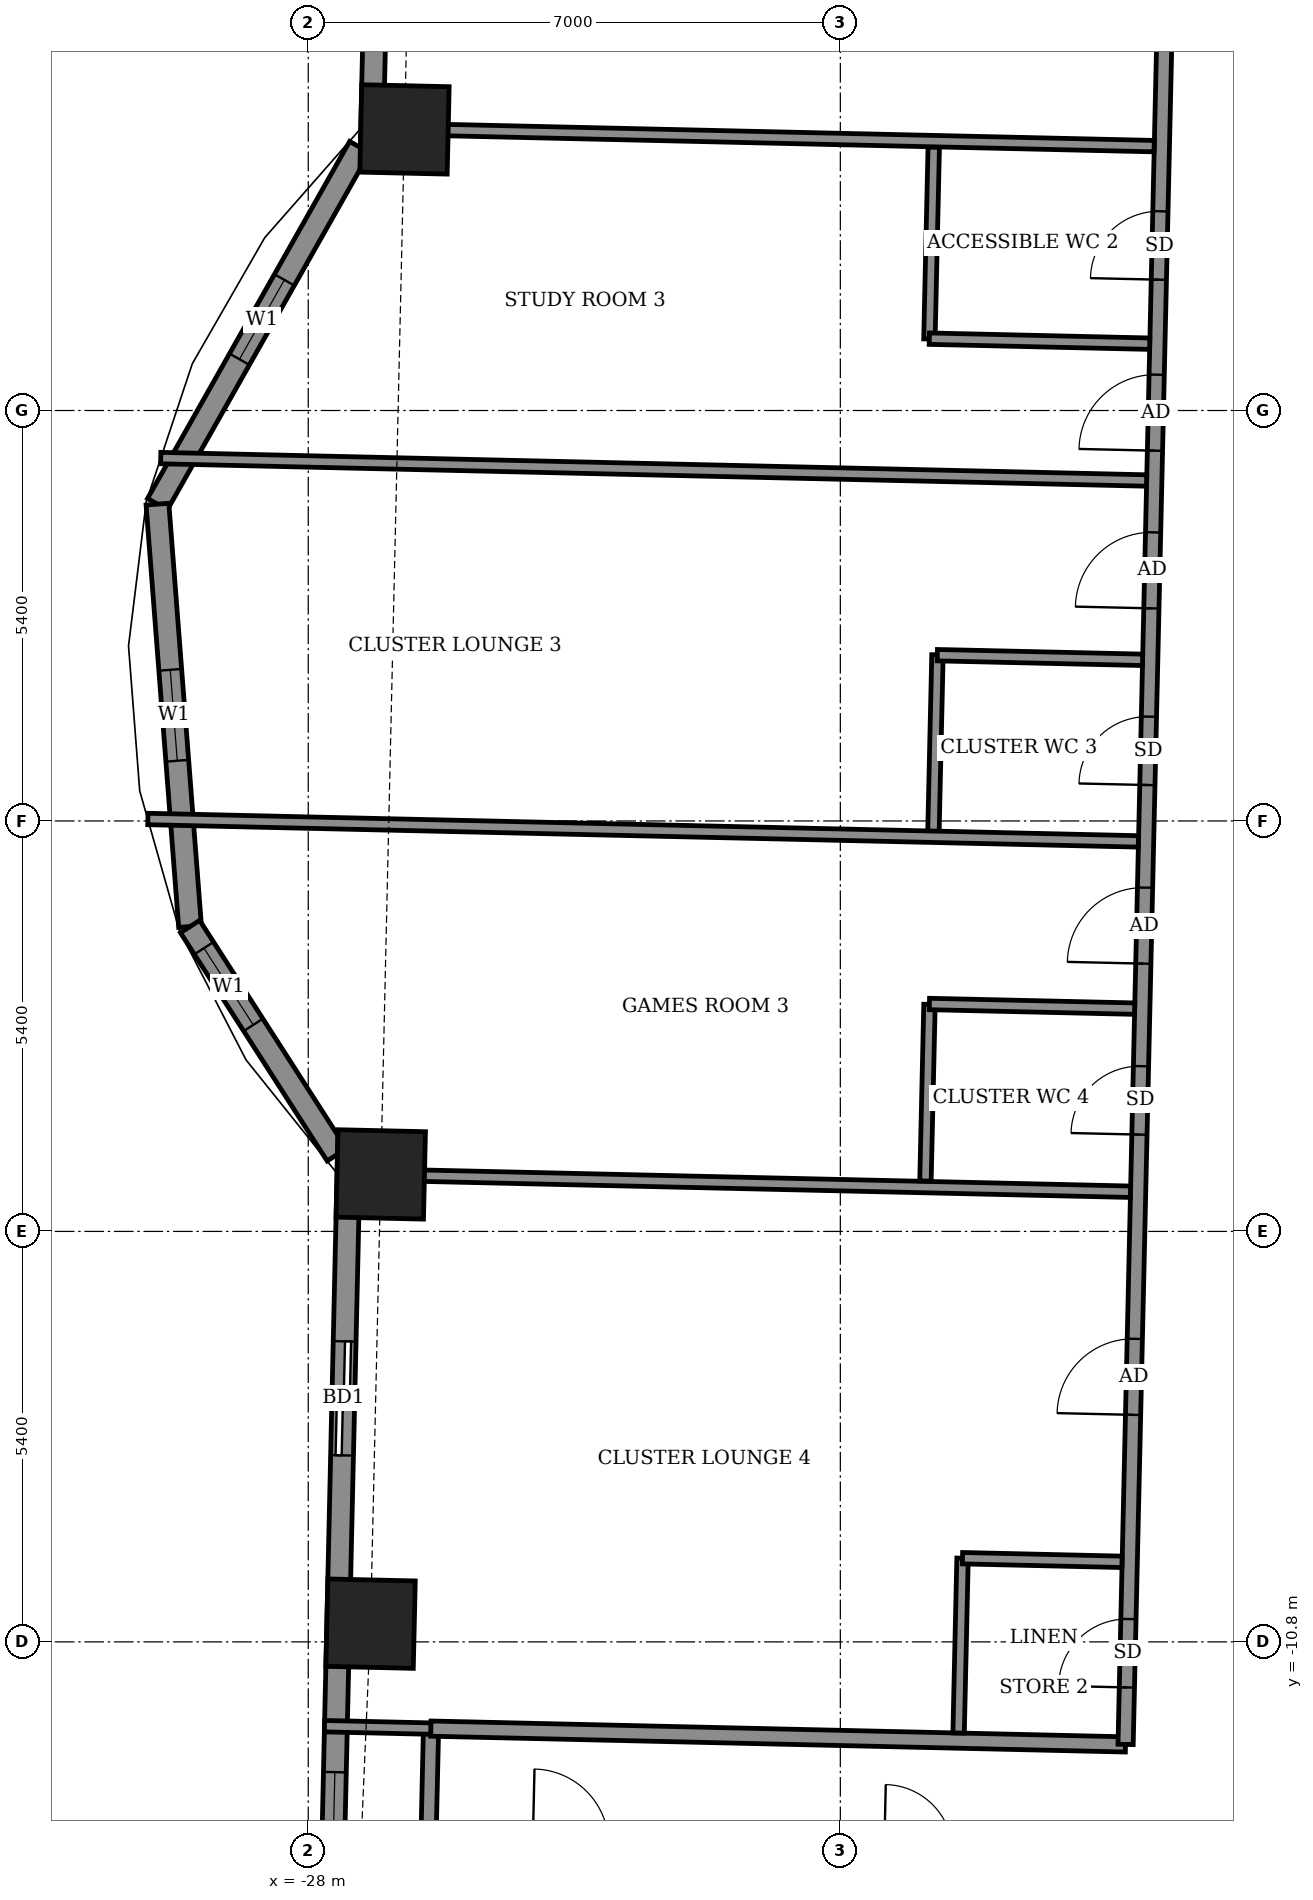
"""IFC4 building model, lengths in metres.
Left out: names, types, materials, properties, quantities, classifications, styles, units other than length and angle.
Written with IfcOpenShell. Run it as: python <this file> out.ifc"""

import sys

from ifc_helpers import new_model, si_unit, direction, frame, frame_2d, origin, origin_2d, place, context, subcontext, project, spatial, rectangle, extrude, element, fill, save


model = new_model("IFC4")
c1 = context("Model", 3, precision=1e-05, world=origin(), true_north=direction((0.0, 1.0)))
c2 = subcontext(c1, "Body", "Model", "MODEL_VIEW")
j1 = project(units=[si_unit("LENGTHUNIT", "METRE"), si_unit("PLANEANGLEUNIT", "RADIAN")], contexts=[c1])
p1 = place(None, origin())
s1 = spatial("IfcSite", under=j1, at=p1, CompositionType="ELEMENT")
p2 = place(p1, origin())
s2 = spatial("IfcBuilding", under=s1, at=p2, CompositionType="ELEMENT")
p3 = place(p2, frame((0.0, 0.0, 205.1)))
s3 = spatial("IfcBuildingStorey", under=s2, at=p3, CompositionType="ELEMENT", Elevation=205.1)
for number, where, z_axis, x_axis in (
    (1, (-27.046, -4.65, -0.55), (0.0, 0.0, 1.0), (-0.023, -1.0, 0.0)),
    (2, (-27.18, -10.56, -0.55), (0.0, 0.0, 1.0), (-0.023, -1.0, 0.0)),
    (3, (-26.734, 9.098, -0.55), (0.0, 0.0, 1.0), (-0.023, -1.0, 0.0)),
):
    element("IfcColumn", number, at=place(p3, frame(where, z_axis=z_axis, x_axis=x_axis)), inside=s3, PredefinedType="COLUMN", context=c2, shape_type="SweptSolid", body=[
        extrude(rectangle(XDim=1.15, YDim=1.15, at=origin_2d()), origin(), (0.0, 0.0, 1.0), 3.6),
    ])
p4 = place(p3, frame((-26.904, 20.379, 0.0), z_axis=(0.0, 0.0, 1.0), x_axis=(-0.022671687694, -0.999742964255, 0.0)))
e4 = element("IfcWall", 4, at=p4, inside=s3, PredefinedType="SOLIDWALL", context=c2, shape_type="SweptSolid", body=[
    extrude(rectangle(XDim=11.824, YDim=0.3, at=frame_2d((5.912, 0.0))), origin(), (0.0, 0.0, 1.0), 2.55),
])
p5 = place(p4, frame((1.603, 0.0, 0.0)))
e5 = element("IfcOpeningElement", 5, at=p5, cuts=e4, PredefinedType="OPENING", context=c2, shape_type="SweptSolid", body=[
    extrude(rectangle(XDim=1.5, YDim=2.4, at=frame_2d((0.75, 1.2))), frame((0.0, 0.16, 0.0), z_axis=(0.0, -1.0, 0.0), x_axis=(1.0, 0.0, 0.0)), (0.0, 0.0, 1.0), 0.32),
])
p6 = place(p4, frame((7.218, 0.0, 0.9)))
e6 = element("IfcOpeningElement", 6, at=p6, cuts=e4, PredefinedType="OPENING", context=c2, shape_type="SweptSolid", body=[
    extrude(rectangle(XDim=2.4, YDim=1.5, at=frame_2d((1.2, 0.75))), frame((0.0, 0.16, 0.0), z_axis=(0.0, -1.0, 0.0), x_axis=(1.0, 0.0, 0.0)), (0.0, 0.0, 1.0), 0.32),
])
p7 = place(p3, frame((-27.325, 8.866, 0.0), z_axis=(0.0, 0.0, 1.0), x_axis=(-0.492554919955, -0.870281363025, 0.0)))
e7 = element("IfcWall", 7, at=p7, inside=s3, PredefinedType="SOLIDWALL", context=c2, shape_type="SweptSolid", body=[
    extrude(rectangle(XDim=5.398, YDim=0.3, at=frame_2d((2.699, 0.0))), origin(), (0.0, 0.0, 1.0), 3.05),
])
p8 = place(p7, frame((2.008, 0.0, 0.9)))
e8 = element("IfcOpeningElement", 8, at=p8, cuts=e7, PredefinedType="OPENING", context=c2, shape_type="SweptSolid", body=[
    extrude(rectangle(XDim=1.2, YDim=1.5, at=frame_2d((0.6, 0.75))), frame((0.0, 0.16, 0.0), z_axis=(0.0, -1.0, 0.0), x_axis=(1.0, 0.0, 0.0)), (0.0, 0.0, 1.0), 0.32),
])
p9 = place(p3, frame((-29.984, 4.168, 0.0), z_axis=(0.0, 0.0, 1.0), x_axis=(0.076964476481, -0.997033835614, 0.0)))
e9 = element("IfcWall", 9, at=p9, inside=s3, PredefinedType="SOLIDWALL", context=c2, shape_type="SweptSolid", body=[
    extrude(rectangle(XDim=5.573, YDim=0.3, at=frame_2d((2.787, 0.0))), origin(), (0.0, 0.0, 1.0), 3.05),
])
p10 = place(p9, frame((2.186, 0.0, 0.9)))
e10 = element("IfcOpeningElement", 10, at=p10, cuts=e9, PredefinedType="OPENING", context=c2, shape_type="SweptSolid", body=[
    extrude(rectangle(XDim=1.2, YDim=1.5, at=frame_2d((0.6, 0.75))), frame((0.0, 0.16, 0.0), z_axis=(0.0, -1.0, 0.0), x_axis=(1.0, 0.0, 0.0)), (0.0, 0.0, 1.0), 0.32),
])
p11 = place(p3, frame((-29.555, -1.389, 0.0), z_axis=(0.0, 0.0, 1.0), x_axis=(0.540622779574, -0.8412651248, 0.0)))
e11 = element("IfcWall", 11, at=p11, inside=s3, PredefinedType="SOLIDWALL", context=c2, shape_type="SweptSolid", body=[
    extrude(rectangle(XDim=3.57, YDim=0.3, at=frame_2d((1.785, 0.0))), origin(), (0.0, 0.0, 1.0), 3.05),
])
p12 = place(p11, frame((0.338, 0.0, 0.9)))
e12 = element("IfcOpeningElement", 12, at=p12, cuts=e11, PredefinedType="OPENING", context=c2, shape_type="SweptSolid", body=[
    extrude(rectangle(XDim=1.2, YDim=1.5, at=frame_2d((0.6, 0.75))), frame((0.0, 0.16, 0.0), z_axis=(0.0, -1.0, 0.0), x_axis=(1.0, 0.0, 0.0)), (0.0, 0.0, 1.0), 0.32),
])
p13 = place(p3, frame((-27.459, -4.091, 0.0), z_axis=(0.0, 0.0, 1.0), x_axis=(-0.022668325129, -0.999743040504, 0.0)))
e13 = element("IfcWall", 13, at=p13, inside=s3, PredefinedType="SOLIDWALL", context=c2, shape_type="SweptSolid", body=[
    extrude(rectangle(XDim=12.224, YDim=0.3, at=frame_2d((6.112, 0.0))), origin(), (0.0, 0.0, 1.0), 2.55),
])
p14 = place(p13, frame((2.756, 0.0, 0.0)))
e14 = element("IfcOpeningElement", 14, at=p14, cuts=e13, PredefinedType="OPENING", context=c2, shape_type="SweptSolid", body=[
    extrude(rectangle(XDim=1.5, YDim=2.4, at=frame_2d((0.75, 1.2))), frame((0.0, 0.16, 0.0), z_axis=(0.0, -1.0, 0.0), x_axis=(1.0, 0.0, 0.0)), (0.0, 0.0, 1.0), 0.32),
])
p15 = place(p13, frame((8.425, 0.0, 0.9)))
e15 = element("IfcOpeningElement", 15, at=p15, cuts=e13, PredefinedType="OPENING", context=c2, shape_type="SweptSolid", body=[
    extrude(rectangle(XDim=2.4, YDim=1.5, at=frame_2d((1.2, 0.75))), frame((0.0, 0.16, 0.0), z_axis=(0.0, -1.0, 0.0), x_axis=(1.0, 0.0, 0.0)), (0.0, 0.0, 1.0), 0.32),
])
p16 = place(p3, frame((-26.419, -13.441, 0.0), z_axis=(0.0, 0.0, 1.0), x_axis=(0.022617910375, 0.999744182344, 0.0)))
e16 = element("IfcWall", 16, at=p16, inside=s3, PredefinedType="PARTITIONING", context=c2, shape_type="SweptSolid", body=[
    extrude(rectangle(XDim=1.5, YDim=0.2, at=frame_2d((0.75, 0.0))), origin(), (0.0, 0.0, 1.0), 3.05),
])
p17 = place(p3, frame((-27.786, -11.909, 0.0), z_axis=(0.0, 0.0, 1.0), x_axis=(0.999740216184, -0.022792545827, 0.0)))
e17 = element("IfcWall", 17, at=p17, inside=s3, PredefinedType="PARTITIONING", context=c2, shape_type="SweptSolid", body=[
    extrude(rectangle(XDim=1.403, YDim=0.15, at=frame_2d((0.702, 0.0))), origin(), (0.0, 0.0, 1.0), 2.55),
])
p18 = place(p3, frame((-26.387, -11.941, 0.0), z_axis=(0.0, 0.0, 1.0), x_axis=(0.999741076645, -0.022754772455, 0.0)))
e18 = element("IfcWall", 18, at=p18, inside=s3, PredefinedType="PARTITIONING", context=c2, shape_type="SweptSolid", body=[
    extrude(rectangle(XDim=9.141, YDim=0.2, at=frame_2d((4.571, 0.0))), origin(), (0.0, 0.0, 1.0), 3.05),
])
p19 = place(p3, frame((-19.444, -11.999, 0.0), z_axis=(0.0, 0.0, 1.0), x_axis=(0.022603288534, 0.999744513037, 0.0)))
e19 = element("IfcWall", 19, at=p19, inside=s3, PredefinedType="PARTITIONING", context=c2, shape_type="SweptSolid", body=[
    extrude(rectangle(XDim=2.301, YDim=0.15, at=frame_2d((1.15, 0.0))), origin(), (0.0, 0.0, 1.0), 3.05),
])
p20 = place(p3, frame((-17.247, -12.149, 0.0), z_axis=(0.0, 0.0, 1.0), x_axis=(0.022698146637, 0.999742363881, 0.0)))
e20 = element("IfcWall", 20, at=p20, inside=s3, PredefinedType="PARTITIONING", context=c2, shape_type="SweptSolid", body=[
    extrude(rectangle(XDim=28.374, YDim=0.2, at=frame_2d((14.187, 0.0))), origin(), (0.0, 0.0, 1.0), 3.05),
])
p21 = place(p20, frame((23.0, 0.0, 0.0)))
e21 = element("IfcOpeningElement", 21, at=p21, cuts=e20, PredefinedType="OPENING", context=c2, shape_type="SweptSolid", body=[
    extrude(rectangle(XDim=1.0, YDim=2.1, at=frame_2d((0.5, 1.05))), frame((0.0, 0.11, 0.0), z_axis=(0.0, -1.0, 0.0), x_axis=(1.0, 0.0, 0.0)), (0.0, 0.0, 1.0), 0.22),
])
p22 = place(p20, frame((26.724, 0.0, 0.0)))
e22 = element("IfcOpeningElement", 22, at=p22, cuts=e20, PredefinedType="OPENING", context=c2, shape_type="SweptSolid", body=[
    extrude(rectangle(XDim=0.9, YDim=2.1, at=frame_2d((0.45, 1.05))), frame((0.0, 0.11, 0.0), z_axis=(0.0, -1.0, 0.0), x_axis=(1.0, 0.0, 0.0)), (0.0, 0.0, 1.0), 0.22),
])
p23 = place(p20, frame((17.025, 0.0, 0.0)))
e23 = element("IfcOpeningElement", 23, at=p23, cuts=e20, PredefinedType="OPENING", context=c2, shape_type="SweptSolid", body=[
    extrude(rectangle(XDim=1.0, YDim=2.1, at=frame_2d((0.5, 1.05))), frame((0.0, 0.11, 0.0), z_axis=(0.0, -1.0, 0.0), x_axis=(1.0, 0.0, 0.0)), (0.0, 0.0, 1.0), 0.22),
])
p24 = place(p20, frame((19.275, 0.0, 0.0)))
e24 = element("IfcOpeningElement", 24, at=p24, cuts=e20, PredefinedType="OPENING", context=c2, shape_type="SweptSolid", body=[
    extrude(rectangle(XDim=0.9, YDim=2.1, at=frame_2d((0.45, 1.05))), frame((0.0, 0.11, 0.0), z_axis=(0.0, -1.0, 0.0), x_axis=(1.0, 0.0, 0.0)), (0.0, 0.0, 1.0), 0.22),
])
p25 = place(p20, frame((14.95, 0.0, 0.0)))
e25 = element("IfcOpeningElement", 25, at=p25, cuts=e20, PredefinedType="OPENING", context=c2, shape_type="SweptSolid", body=[
    extrude(rectangle(XDim=1.0, YDim=2.1, at=frame_2d((0.5, 1.05))), frame((0.0, 0.11, 0.0), z_axis=(0.0, -1.0, 0.0), x_axis=(1.0, 0.0, 0.0)), (0.0, 0.0, 1.0), 0.22),
])
p26 = place(p20, frame((12.625, 0.0, 0.0)))
e26 = element("IfcOpeningElement", 26, at=p26, cuts=e20, PredefinedType="OPENING", context=c2, shape_type="SweptSolid", body=[
    extrude(rectangle(XDim=0.9, YDim=2.1, at=frame_2d((0.45, 1.05))), frame((0.0, 0.11, 0.0), z_axis=(0.0, -1.0, 0.0), x_axis=(1.0, 0.0, 0.0)), (0.0, 0.0, 1.0), 0.22),
])
p27 = place(p20, frame((10.275, 0.0, 0.0)))
e27 = element("IfcOpeningElement", 27, at=p27, cuts=e20, PredefinedType="OPENING", context=c2, shape_type="SweptSolid", body=[
    extrude(rectangle(XDim=1.0, YDim=2.1, at=frame_2d((0.5, 1.05))), frame((0.0, 0.11, 0.0), z_axis=(0.0, -1.0, 0.0), x_axis=(1.0, 0.0, 0.0)), (0.0, 0.0, 1.0), 0.22),
])
p28 = place(p20, frame((8.025, 0.0, 0.0)))
e28 = element("IfcOpeningElement", 28, at=p28, cuts=e20, PredefinedType="OPENING", context=c2, shape_type="SweptSolid", body=[
    extrude(rectangle(XDim=0.9, YDim=2.1, at=frame_2d((0.45, 1.05))), frame((0.0, 0.11, 0.0), z_axis=(0.0, -1.0, 0.0), x_axis=(1.0, 0.0, 0.0)), (0.0, 0.0, 1.0), 0.22),
])
p29 = place(p20, frame((4.337, 0.0, 0.0)))
e29 = element("IfcOpeningElement", 29, at=p29, cuts=e20, PredefinedType="OPENING", context=c2, shape_type="SweptSolid", body=[
    extrude(rectangle(XDim=1.0, YDim=2.1, at=frame_2d((0.5, 1.05))), frame((0.0, 0.11, 0.0), z_axis=(0.0, -1.0, 0.0), x_axis=(1.0, 0.0, 0.0)), (0.0, 0.0, 1.0), 0.22),
])
p30 = place(p20, frame((0.75, 0.0, 0.0)))
e30 = element("IfcOpeningElement", 30, at=p30, cuts=e20, PredefinedType="OPENING", context=c2, shape_type="SweptSolid", body=[
    extrude(rectangle(XDim=0.9, YDim=2.1, at=frame_2d((0.45, 1.05))), frame((0.0, 0.11, 0.0), z_axis=(0.0, -1.0, 0.0), x_axis=(1.0, 0.0, 0.0)), (0.0, 0.0, 1.0), 0.22),
])
p31 = place(p3, frame((-19.393, -9.699, 0.0), z_axis=(0.0, 0.0, 1.0), x_axis=(0.999737616439, -0.022906293375, 0.0)))
e31 = element("IfcWall", 31, at=p31, inside=s3, PredefinedType="PARTITIONING", context=c2, shape_type="SweptSolid", body=[
    extrude(rectangle(XDim=2.1, YDim=0.15, at=frame_2d((1.05, 0.0))), origin(), (0.0, 0.0, 1.0), 3.05),
])
p32 = place(p3, frame((-27.322, -4.648, 0.0), z_axis=(0.0, 0.0, 1.0), x_axis=(0.999742841246, -0.022677111331, 0.0)))
e32 = element("IfcWall", 32, at=p32, inside=s3, PredefinedType="PARTITIONING", context=c2, shape_type="SweptSolid", body=[
    extrude(rectangle(XDim=10.142, YDim=0.15, at=frame_2d((5.071, 0.0))), origin(), (0.0, 0.0, 1.0), 3.05),
])
p33 = place(p3, frame((-19.88, -4.737, 0.0), z_axis=(0.0, 0.0, 1.0), x_axis=(0.02279059109, 0.999740260747, 0.0)))
e33 = element("IfcWall", 33, at=p33, inside=s3, PredefinedType="PARTITIONING", context=c2, shape_type="SweptSolid", body=[
    extrude(rectangle(XDim=2.324, YDim=0.15, at=frame_2d((1.162, 0.0))), origin(), (0.0, 0.0, 1.0), 3.05),
])
p34 = place(p3, frame((-19.828, -2.408, 0.0), z_axis=(0.0, 0.0, 1.0), x_axis=(0.99974458177, -0.022600248254, 0.0)))
e34 = element("IfcWall", 34, at=p34, inside=s3, PredefinedType="PARTITIONING", context=c2, shape_type="SweptSolid", body=[
    extrude(rectangle(XDim=2.701, YDim=0.15, at=frame_2d((1.35, 0.0))), origin(), (0.0, 0.0, 1.0), 3.05),
])
p35 = place(p3, frame((-19.775, -0.138, 0.0), z_axis=(0.0, 0.0, 1.0), x_axis=(0.02279059109, 0.999740260747, 0.0)))
e35 = element("IfcWall", 35, at=p35, inside=s3, PredefinedType="PARTITIONING", context=c2, shape_type="SweptSolid", body=[
    extrude(rectangle(XDim=2.324, YDim=0.15, at=frame_2d((1.162, 0.0))), origin(), (0.0, 0.0, 1.0), 3.05),
])
p36 = place(p3, frame((-30.11, 0.026, 0.0), z_axis=(0.0, 0.0, 1.0), x_axis=(0.999743987427, -0.022626524343, 0.0)))
e36 = element("IfcWall", 36, at=p36, inside=s3, PredefinedType="PARTITIONING", context=c2, shape_type="SweptSolid", body=[
    extrude(rectangle(XDim=13.034, YDim=0.15, at=frame_2d((6.517, 0.0))), origin(), (0.0, 0.0, 1.0), 2.05),
])
p37 = place(p3, frame((-19.724, 2.181, 0.0), z_axis=(0.0, 0.0, 1.0), x_axis=(0.999746666054, -0.022507858937, 0.0)))
e37 = element("IfcWall", 37, at=p37, inside=s3, PredefinedType="PARTITIONING", context=c2, shape_type="SweptSolid", body=[
    extrude(rectangle(XDim=2.701, YDim=0.15, at=frame_2d((1.351, 0.0))), origin(), (0.0, 0.0, 1.0), 3.05),
])
p38 = place(p3, frame((-29.941, 4.774, 0.0), z_axis=(0.0, 0.0, 1.0), x_axis=(0.999741573163, -0.022732947207, 0.0)))
e38 = element("IfcWall", 38, at=p38, inside=s3, PredefinedType="PARTITIONING", context=c2, shape_type="SweptSolid", body=[
    extrude(rectangle(XDim=12.973, YDim=0.15, at=frame_2d((6.487, 0.0))), origin(), (0.0, 0.0, 1.0), 2.05),
])
p39 = place(p3, frame((-19.828, 6.34, 0.0), z_axis=(0.0, 0.0, 1.0), x_axis=(0.022532486354, 0.9997461113, 0.0)))
e39 = element("IfcWall", 39, at=p39, inside=s3, PredefinedType="PARTITIONING", context=c2, shape_type="SweptSolid", body=[
    extrude(rectangle(XDim=2.525, YDim=0.15, at=frame_2d((1.262, 0.0))), origin(), (0.0, 0.0, 1.0), 3.05),
])
p40 = place(p3, frame((-19.829, 6.345, 0.0), z_axis=(0.0, 0.0, 1.0), x_axis=(0.999741618182, -0.022730967319, 0.0)))
e40 = element("IfcWall", 40, at=p40, inside=s3, PredefinedType="PARTITIONING", context=c2, shape_type="SweptSolid", body=[
    extrude(rectangle(XDim=2.9, YDim=0.15, at=frame_2d((1.45, 0.0))), origin(), (0.0, 0.0, 1.0), 3.05),
])
p41 = place(p3, frame((-27.01, 9.108, 0.0), z_axis=(0.0, 0.0, 1.0), x_axis=(0.999742841246, -0.022677111331, 0.0)))
e41 = element("IfcWall", 41, at=p41, inside=s3, PredefinedType="PARTITIONING", context=c2, shape_type="SweptSolid", body=[
    extrude(rectangle(XDim=10.142, YDim=0.15, at=frame_2d((5.071, 0.0))), origin(), (0.0, 0.0, 1.0), 3.05),
])
p42 = place(p8, origin())
e42 = element("IfcWindow", 42, at=p42, inside=s3, PartitioningType="SINGLE_PANEL", PredefinedType="WINDOW", context=c2, shape_type="SweptSolid", body=[
    extrude(rectangle(XDim=1.2, YDim=1.5, at=frame_2d((0.6, 0.75))), frame((0.0, 0.03, 0.0), z_axis=(0.0, -1.0, 0.0), x_axis=(1.0, 0.0, 0.0)), (0.0, 0.0, 1.0), 0.06),
])
fill(e8, e42)
p43 = place(p10, origin())
e43 = element("IfcWindow", 43, at=p43, inside=s3, PartitioningType="SINGLE_PANEL", PredefinedType="WINDOW", context=c2, shape_type="SweptSolid", body=[
    extrude(rectangle(XDim=1.2, YDim=1.5, at=frame_2d((0.6, 0.75))), frame((0.0, 0.03, 0.0), z_axis=(0.0, -1.0, 0.0), x_axis=(1.0, 0.0, 0.0)), (0.0, 0.0, 1.0), 0.06),
])
fill(e10, e43)
p44 = place(p12, origin())
e44 = element("IfcWindow", 44, at=p44, inside=s3, PartitioningType="SINGLE_PANEL", PredefinedType="WINDOW", context=c2, shape_type="SweptSolid", body=[
    extrude(rectangle(XDim=1.2, YDim=1.5, at=frame_2d((0.6, 0.75))), frame((0.0, 0.03, 0.0), z_axis=(0.0, -1.0, 0.0), x_axis=(1.0, 0.0, 0.0)), (0.0, 0.0, 1.0), 0.06),
])
fill(e12, e44)
p45 = place(p14, origin())
e45 = element("IfcDoor", 45, at=p45, inside=s3, OperationType="SLIDING_TO_LEFT", PredefinedType="DOOR", context=c2, shape_type="SweptSolid", body=[
    extrude(rectangle(XDim=1.5, YDim=2.4, at=frame_2d((0.75, 1.2))), frame((0.0, 0.025, 0.0), z_axis=(0.0, -1.0, 0.0), x_axis=(1.0, 0.0, 0.0)), (0.0, 0.0, 1.0), 0.05),
])
fill(e14, e45)
p46 = place(p15, origin())
e46 = element("IfcWindow", 46, at=p46, inside=s3, PartitioningType="DOUBLE_PANEL_VERTICAL", PredefinedType="WINDOW", context=c2, shape_type="SweptSolid", body=[
    extrude(rectangle(XDim=2.4, YDim=1.5, at=frame_2d((1.2, 0.75))), frame((0.0, 0.03, 0.0), z_axis=(0.0, -1.0, 0.0), x_axis=(1.0, 0.0, 0.0)), (0.0, 0.0, 1.0), 0.06),
])
fill(e15, e46)
p47 = place(p23, origin())
e47 = element("IfcDoor", 47, at=p47, inside=s3, OperationType="SINGLE_SWING_RIGHT", PredefinedType="DOOR", context=c2, shape_type="SweptSolid", body=[
    extrude(rectangle(XDim=1.0, YDim=2.1, at=frame_2d((0.5, 1.05))), frame((0.0, 0.025, 0.0), z_axis=(0.0, -1.0, 0.0), x_axis=(1.0, 0.0, 0.0)), (0.0, 0.0, 1.0), 0.05),
])
fill(e23, e47)
p48 = place(p24, origin())
e48 = element("IfcDoor", 48, at=p48, inside=s3, OperationType="SINGLE_SWING_LEFT", PredefinedType="DOOR", context=c2, shape_type="SweptSolid", body=[
    extrude(rectangle(XDim=0.9, YDim=2.1, at=frame_2d((0.45, 1.05))), frame((0.0, 0.025, 0.0), z_axis=(0.0, -1.0, 0.0), x_axis=(1.0, 0.0, 0.0)), (0.0, 0.0, 1.0), 0.05),
])
fill(e24, e48)
p49 = place(p25, origin())
e49 = element("IfcDoor", 49, at=p49, inside=s3, OperationType="SINGLE_SWING_LEFT", PredefinedType="DOOR", context=c2, shape_type="SweptSolid", body=[
    extrude(rectangle(XDim=1.0, YDim=2.1, at=frame_2d((0.5, 1.05))), frame((0.0, 0.025, 0.0), z_axis=(0.0, -1.0, 0.0), x_axis=(1.0, 0.0, 0.0)), (0.0, 0.0, 1.0), 0.05),
])
fill(e25, e49)
p50 = place(p26, origin())
e50 = element("IfcDoor", 50, at=p50, inside=s3, OperationType="SINGLE_SWING_RIGHT", PredefinedType="DOOR", context=c2, shape_type="SweptSolid", body=[
    extrude(rectangle(XDim=0.9, YDim=2.1, at=frame_2d((0.45, 1.05))), frame((0.0, 0.025, 0.0), z_axis=(0.0, -1.0, 0.0), x_axis=(1.0, 0.0, 0.0)), (0.0, 0.0, 1.0), 0.05),
])
fill(e26, e50)
p51 = place(p27, origin())
e51 = element("IfcDoor", 51, at=p51, inside=s3, OperationType="SINGLE_SWING_RIGHT", PredefinedType="DOOR", context=c2, shape_type="SweptSolid", body=[
    extrude(rectangle(XDim=1.0, YDim=2.1, at=frame_2d((0.5, 1.05))), frame((0.0, 0.025, 0.0), z_axis=(0.0, -1.0, 0.0), x_axis=(1.0, 0.0, 0.0)), (0.0, 0.0, 1.0), 0.05),
])
fill(e27, e51)
p52 = place(p28, origin())
e52 = element("IfcDoor", 52, at=p52, inside=s3, OperationType="SINGLE_SWING_LEFT", PredefinedType="DOOR", context=c2, shape_type="SweptSolid", body=[
    extrude(rectangle(XDim=0.9, YDim=2.1, at=frame_2d((0.45, 1.05))), frame((0.0, 0.025, 0.0), z_axis=(0.0, -1.0, 0.0), x_axis=(1.0, 0.0, 0.0)), (0.0, 0.0, 1.0), 0.05),
])
fill(e28, e52)
p53 = place(p29, origin())
e53 = element("IfcDoor", 53, at=p53, inside=s3, OperationType="SINGLE_SWING_LEFT", PredefinedType="DOOR", context=c2, shape_type="SweptSolid", body=[
    extrude(rectangle(XDim=1.0, YDim=2.1, at=frame_2d((0.5, 1.05))), frame((0.0, 0.025, 0.0), z_axis=(0.0, -1.0, 0.0), x_axis=(1.0, 0.0, 0.0)), (0.0, 0.0, 1.0), 0.05),
])
fill(e29, e53)
p54 = place(p30, origin())
e54 = element("IfcDoor", 54, at=p54, inside=s3, OperationType="SINGLE_SWING_RIGHT", PredefinedType="DOOR", context=c2, shape_type="SweptSolid", body=[
    extrude(rectangle(XDim=0.9, YDim=2.1, at=frame_2d((0.45, 1.05))), frame((0.0, 0.025, 0.0), z_axis=(0.0, -1.0, 0.0), x_axis=(1.0, 0.0, 0.0)), (0.0, 0.0, 1.0), 0.05),
])
fill(e30, e54)
save(model, sys.argv[1])
